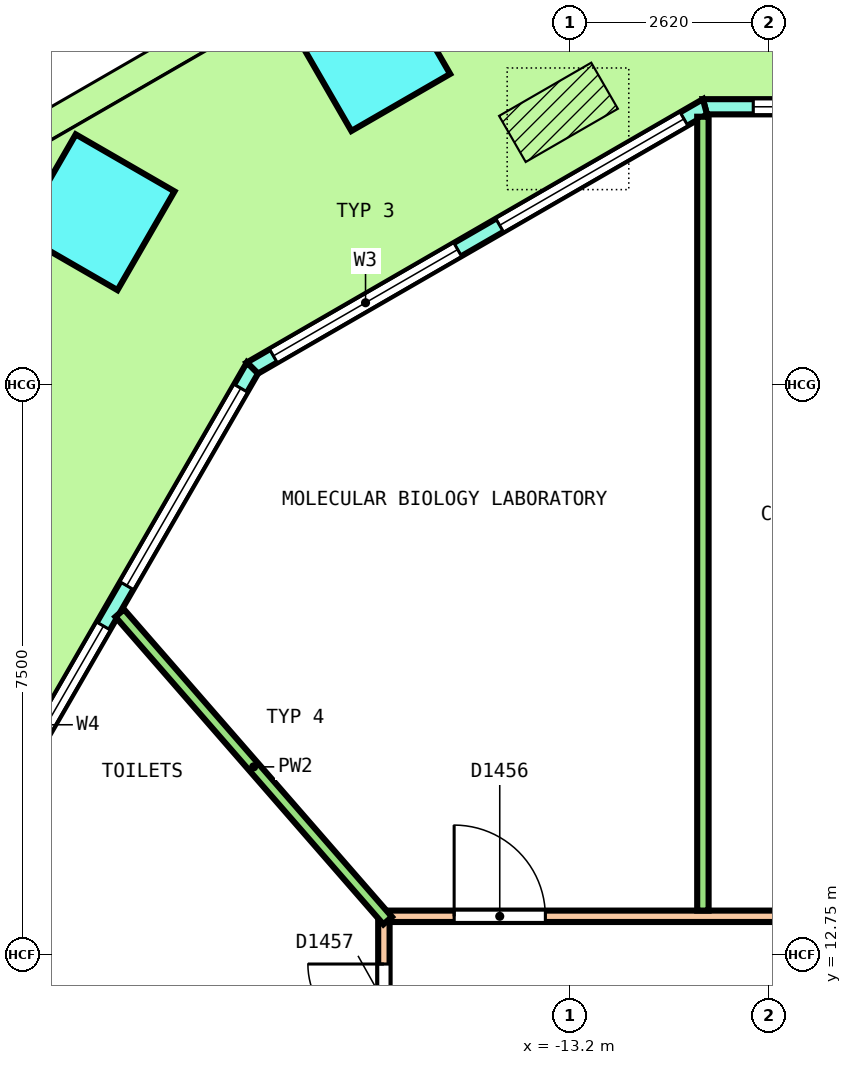
"""IFC4 building model, lengths in metres.
Left out: names, types, materials, properties, quantities, classifications, styles, units other than length and angle.
Written with IfcOpenShell. Run it as: python <this file> out.ifc"""

import sys

from ifc_helpers import new_model, si_unit, direction, frame, frame_2d, origin, origin_2d, place, context, subcontext, project, spatial, polyline, rectangle, outline, extrude, element, fill, save


model = new_model("IFC4")
c1 = context("Model", 3, precision=1e-05, world=origin(), true_north=direction((0.0, 1.0)))
c2 = subcontext(c1, "Body", "Model", "MODEL_VIEW")
j1 = project(units=[si_unit("LENGTHUNIT", "METRE"), si_unit("PLANEANGLEUNIT", "RADIAN")], contexts=[c1])
p1 = place(None, origin())
s1 = spatial("IfcSite", under=j1, at=p1, CompositionType="ELEMENT")
p2 = place(p1, origin())
s2 = spatial("IfcBuilding", under=s1, at=p2, CompositionType="ELEMENT")
p3 = place(p2, frame((0.0, 0.0, 63.0)))
s3 = spatial("IfcBuildingStorey", under=s2, at=p3, CompositionType="ELEMENT", Elevation=63.0)
for number, where, z_axis, x_axis in (
    (1, (-15.803, 24.606, 0.0), (0.0, 0.0, 1.0), (-0.866, -0.5, 0.0)),
    (2, (-19.43, 22.512, 0.0), (0.0, 0.0, 1.0), (-0.5, -0.866, 0.0)),
):
    element("IfcColumn", number, at=place(p3, frame(where, z_axis=z_axis, x_axis=x_axis)), inside=s3, PredefinedType="COLUMN", context=c2, shape_type="SweptSolid", body=[
        extrude(rectangle(XDim=1.5, YDim=1.5, at=origin_2d()), origin(), (0.0, 0.0, 1.0), 4.04),
    ])
p4 = place(p3, frame((11.426, 23.9, 0.0), z_axis=(0.0, 0.0, 1.0), x_axis=(-1.0, 0.0, 0.0)))
e3 = element("IfcWall", 3, at=p4, inside=s3, PredefinedType="SOLIDWALL", context=c2, shape_type="SweptSolid", body=[
    extrude(outline(polyline([(-0.027, -0.1), (1.014, -0.1), (2.055, -0.1), (3.097, -0.1), (4.138, -0.1), (5.179, -0.1), (6.22, -0.1), (7.261, -0.1), (8.303, -0.1), (9.344, -0.1), (10.385, -0.1), (11.426, -0.1), (12.468, -0.1), (13.509, -0.1), (14.55, -0.1), (15.591, -0.1), (16.632, -0.1), (17.673, -0.1), (18.715, -0.1), (19.756, -0.1), (20.797, -0.1), (21.838, -0.1), (22.879, -0.1), (22.826, 0.1), (21.789, 0.1), (20.753, 0.1), (19.717, 0.1), (18.68, 0.1), (17.644, 0.1), (16.608, 0.1), (15.572, 0.1), (14.535, 0.1), (13.499, 0.1), (12.463, 0.1), (11.426, 0.1), (10.39, 0.1), (9.354, 0.1), (8.317, 0.1), (7.281, 0.1), (6.245, 0.1), (5.208, 0.1), (4.172, 0.1), (3.136, 0.1), (2.099, 0.1), (1.063, 0.1), (0.027, 0.1), (-0.027, -0.1)])), origin(), (0.0, 0.0, 1.0), 4.1),
])
p5 = place(p4, frame((0.635, 0.0, 0.1)))
e4 = element("IfcOpeningElement", 4, at=p5, cuts=e3, PredefinedType="OPENING", context=c2, shape_type="SweptSolid", body=[
    extrude(rectangle(XDim=3.3, YDim=2.9, at=frame_2d((1.65, 1.45))), frame((0.0, 0.11, 0.0), z_axis=(0.0, -1.0, 0.0), x_axis=(1.0, 0.0, 0.0)), (0.0, 0.0, 1.0), 0.22),
])
p6 = place(p4, frame((5.206, 0.0, 0.1)))
e5 = element("IfcOpeningElement", 5, at=p6, cuts=e3, PredefinedType="OPENING", context=c2, shape_type="SweptSolid", body=[
    extrude(rectangle(XDim=3.3, YDim=2.9, at=frame_2d((1.65, 1.45))), frame((0.0, 0.11, 0.0), z_axis=(0.0, -1.0, 0.0), x_axis=(1.0, 0.0, 0.0)), (0.0, 0.0, 1.0), 0.22),
])
p7 = place(p4, frame((10.526, 0.0, 0.0)))
e6 = element("IfcOpeningElement", 6, at=p7, cuts=e3, PredefinedType="OPENING", context=c2, shape_type="SweptSolid", body=[
    extrude(rectangle(XDim=1.8, YDim=2.4, at=frame_2d((0.9, 1.2))), frame((0.0, 0.11, 0.0), z_axis=(0.0, -1.0, 0.0), x_axis=(1.0, 0.0, 0.0)), (0.0, 0.0, 1.0), 0.22),
])
p8 = place(p4, frame((10.526, 0.0, 2.55)))
e7 = element("IfcOpeningElement", 7, at=p8, cuts=e3, PredefinedType="OPENING", context=c2, shape_type="SweptSolid", body=[
    extrude(rectangle(XDim=1.8, YDim=0.45, at=frame_2d((0.9, 0.225))), frame((0.0, 0.11, 0.0), z_axis=(0.0, -1.0, 0.0), x_axis=(1.0, 0.0, 0.0)), (0.0, 0.0, 1.0), 0.22),
])
p9 = place(p4, frame((14.347, 0.0, 0.1)))
e8 = element("IfcOpeningElement", 8, at=p9, cuts=e3, PredefinedType="OPENING", context=c2, shape_type="SweptSolid", body=[
    extrude(rectangle(XDim=3.3, YDim=2.9, at=frame_2d((1.65, 1.45))), frame((0.0, 0.11, 0.0), z_axis=(0.0, -1.0, 0.0), x_axis=(1.0, 0.0, 0.0)), (0.0, 0.0, 1.0), 0.22),
])
p10 = place(p4, frame((18.917, 0.0, 0.1)))
e9 = element("IfcOpeningElement", 9, at=p10, cuts=e3, PredefinedType="OPENING", context=c2, shape_type="SweptSolid", body=[
    extrude(rectangle(XDim=3.3, YDim=2.9, at=frame_2d((1.65, 1.45))), frame((0.0, 0.11, 0.0), z_axis=(0.0, -1.0, 0.0), x_axis=(1.0, 0.0, 0.0)), (0.0, 0.0, 1.0), 0.22),
])
p11 = place(p3, frame((-11.426, 23.9, 0.0), z_axis=(0.0, 0.0, 1.0), x_axis=(-0.866029458321, -0.49999297727, 0.0)))
e10 = element("IfcWall", 10, at=p11, inside=s3, PredefinedType="SOLIDWALL", context=c2, shape_type="SweptSolid", body=[
    extrude(outline(polyline([(-0.027, -0.1), (1.128, -0.1), (2.282, -0.1), (3.437, -0.1), (4.592, -0.1), (5.747, -0.1), (6.901, -0.1), (6.848, 0.1), (5.711, 0.1), (4.574, 0.1), (3.437, 0.1), (2.301, 0.1), (1.164, 0.1), (0.027, 0.1), (-0.027, -0.1)])), origin(), (0.0, 0.0, 1.0), 4.1),
])
p12 = place(p11, frame((0.319, 0.0, 0.1)))
e11 = element("IfcOpeningElement", 11, at=p12, cuts=e10, PredefinedType="OPENING", context=c2, shape_type="SweptSolid", body=[
    extrude(rectangle(XDim=2.8, YDim=2.9, at=frame_2d((1.4, 1.45))), frame((0.0, 0.11, 0.0), z_axis=(0.0, -1.0, 0.0), x_axis=(1.0, 0.0, 0.0)), (0.0, 0.0, 1.0), 0.22),
])
p13 = place(p11, frame((3.756, 0.0, 0.1)))
e12 = element("IfcOpeningElement", 12, at=p13, cuts=e10, PredefinedType="OPENING", context=c2, shape_type="SweptSolid", body=[
    extrude(rectangle(XDim=2.8, YDim=2.9, at=frame_2d((1.4, 1.45))), frame((0.0, 0.11, 0.0), z_axis=(0.0, -1.0, 0.0), x_axis=(1.0, 0.0, 0.0)), (0.0, 0.0, 1.0), 0.22),
])
p14 = place(p3, frame((-17.38, 20.463, 0.0), z_axis=(0.0, 0.0, 1.0), x_axis=(-0.500000137386, -0.866025324465, 0.0)))
e13 = element("IfcWall", 13, at=p14, inside=s3, PredefinedType="SOLIDWALL", context=c2, shape_type="SweptSolid", body=[
    extrude(outline(polyline([(-0.027, -0.1), (0.979, -0.1), (1.986, -0.1), (2.992, -0.1), (3.999, -0.1), (5.005, -0.1), (6.012, -0.1), (7.018, -0.1), (8.025, -0.1), (9.031, -0.1), (10.038, -0.1), (11.044, -0.1), (12.051, -0.1), (13.057, -0.1), (14.063, -0.1), (15.07, -0.1), (16.076, -0.1), (17.083, -0.1), (18.089, -0.1), (18.036, 0.1), (17.035, 0.1), (16.035, 0.1), (15.034, 0.1), (14.034, 0.1), (13.033, 0.1), (12.033, 0.1), (11.032, 0.1), (10.032, 0.1), (9.031, 0.1), (8.031, 0.1), (7.03, 0.1), (6.03, 0.1), (5.029, 0.1), (4.029, 0.1), (3.028, 0.1), (2.028, 0.1), (1.027, 0.1), (0.027, 0.1), (-0.027, -0.1)])), origin(), (0.0, 0.0, 1.0), 4.1),
])
p15 = place(p14, frame((0.306, 0.0, 0.1)))
e14 = element("IfcOpeningElement", 14, at=p15, cuts=e13, PredefinedType="OPENING", context=c2, shape_type="SweptSolid", body=[
    extrude(rectangle(XDim=3.0, YDim=2.9, at=frame_2d((1.5, 1.45))), frame((0.0, 0.11, 0.0), z_axis=(0.0, -1.0, 0.0), x_axis=(1.0, 0.0, 0.0)), (0.0, 0.0, 1.0), 0.22),
])
p16 = place(p14, frame((3.919, 0.0, 0.1)))
e15 = element("IfcOpeningElement", 15, at=p16, cuts=e13, PredefinedType="OPENING", context=c2, shape_type="SweptSolid", body=[
    extrude(rectangle(XDim=3.0, YDim=2.9, at=frame_2d((1.5, 1.45))), frame((0.0, 0.11, 0.0), z_axis=(0.0, -1.0, 0.0), x_axis=(1.0, 0.0, 0.0)), (0.0, 0.0, 1.0), 0.22),
])
p17 = place(p14, frame((8.131, 0.0, 0.0)))
e16 = element("IfcOpeningElement", 16, at=p17, cuts=e13, PredefinedType="OPENING", context=c2, shape_type="SweptSolid", body=[
    extrude(rectangle(XDim=1.8, YDim=2.4, at=frame_2d((0.9, 1.2))), frame((0.0, 0.11, 0.0), z_axis=(0.0, -1.0, 0.0), x_axis=(1.0, 0.0, 0.0)), (0.0, 0.0, 1.0), 0.22),
])
p18 = place(p14, frame((8.131, 0.0, 2.55)))
e17 = element("IfcOpeningElement", 17, at=p18, cuts=e13, PredefinedType="OPENING", context=c2, shape_type="SweptSolid", body=[
    extrude(rectangle(XDim=1.8, YDim=0.45, at=frame_2d((0.9, 0.225))), frame((0.0, 0.11, 0.0), z_axis=(0.0, -1.0, 0.0), x_axis=(1.0, 0.0, 0.0)), (0.0, 0.0, 1.0), 0.22),
])
p19 = place(p14, frame((11.144, 0.0, 0.1)))
e18 = element("IfcOpeningElement", 18, at=p19, cuts=e13, PredefinedType="OPENING", context=c2, shape_type="SweptSolid", body=[
    extrude(rectangle(XDim=3.0, YDim=2.9, at=frame_2d((1.5, 1.45))), frame((0.0, 0.11, 0.0), z_axis=(0.0, -1.0, 0.0), x_axis=(1.0, 0.0, 0.0)), (0.0, 0.0, 1.0), 0.22),
])
p20 = place(p14, frame((14.756, 0.0, 0.1)))
e19 = element("IfcOpeningElement", 19, at=p20, cuts=e13, PredefinedType="OPENING", context=c2, shape_type="SweptSolid", body=[
    extrude(rectangle(XDim=3.0, YDim=2.9, at=frame_2d((1.5, 1.45))), frame((0.0, 0.11, 0.0), z_axis=(0.0, -1.0, 0.0), x_axis=(1.0, 0.0, 0.0)), (0.0, 0.0, 1.0), 0.22),
])
p21 = place(p3, frame((-15.575, 13.25, 0.0), z_axis=(0.0, 0.0, 1.0), x_axis=(1.0, 0.0, 0.0)))
e20 = element("IfcWall", 20, at=p21, inside=s3, PredefinedType="PARTITIONING", context=c2, shape_type="SweptSolid", body=[
    extrude(rectangle(XDim=31.175, YDim=0.15, at=frame_2d((15.587, 0.0))), origin(), (0.0, 0.0, 1.0), 3.05),
])
p22 = place(p21, frame((28.252, 0.0, 0.0)))
e21 = element("IfcOpeningElement", 21, at=p22, cuts=e20, PredefinedType="OPENING", context=c2, shape_type="SweptSolid", body=[
    extrude(rectangle(XDim=1.0, YDim=2.1, at=frame_2d((0.5, 1.05))), frame((0.0, 0.085, 0.0), z_axis=(0.0, -1.0, 0.0), x_axis=(1.0, 0.0, 0.0)), (0.0, 0.0, 1.0), 0.17),
])
p23 = place(p21, frame((14.802, 0.0, 0.0)))
e22 = element("IfcOpeningElement", 22, at=p23, cuts=e20, PredefinedType="OPENING", context=c2, shape_type="SweptSolid", body=[
    extrude(rectangle(XDim=1.2, YDim=2.1, at=frame_2d((0.6, 1.05))), frame((0.0, 0.085, 0.0), z_axis=(0.0, -1.0, 0.0), x_axis=(1.0, 0.0, 0.0)), (0.0, 0.0, 1.0), 0.17),
])
p24 = place(p21, frame((5.812, 0.0, 0.0)))
e23 = element("IfcOpeningElement", 23, at=p24, cuts=e20, PredefinedType="OPENING", context=c2, shape_type="SweptSolid", body=[
    extrude(rectangle(XDim=1.2, YDim=2.1, at=frame_2d((0.6, 1.05))), frame((0.0, 0.085, 0.0), z_axis=(0.0, -1.0, 0.0), x_axis=(1.0, 0.0, 0.0)), (0.0, 0.0, 1.0), 0.17),
])
p25 = place(p21, frame((0.849, 0.0, 0.0)))
e24 = element("IfcOpeningElement", 24, at=p25, cuts=e20, PredefinedType="OPENING", context=c2, shape_type="SweptSolid", body=[
    extrude(rectangle(XDim=1.2, YDim=2.1, at=frame_2d((0.6, 1.05))), frame((0.0, 0.085, 0.0), z_axis=(0.0, -1.0, 0.0), x_axis=(1.0, 0.0, 0.0)), (0.0, 0.0, 1.0), 0.17),
])
p26 = place(p3, frame((-15.65, -13.175, 0.0), z_axis=(0.0, 0.0, 1.0), x_axis=(0.0, 1.0, 0.0)))
e25 = element("IfcWall", 25, at=p26, inside=s3, PredefinedType="PARTITIONING", context=c2, shape_type="SweptSolid", body=[
    extrude(rectangle(XDim=26.35, YDim=0.15, at=frame_2d((13.175, 0.0))), origin(), (0.0, 0.0, 1.0), 3.05),
])
p27 = place(p26, frame((24.797, 0.0, 0.0)))
e26 = element("IfcOpeningElement", 26, at=p27, cuts=e25, PredefinedType="OPENING", context=c2, shape_type="SweptSolid", body=[
    extrude(rectangle(XDim=1.0, YDim=2.1, at=frame_2d((0.5, 1.05))), frame((0.0, 0.085, 0.0), z_axis=(0.0, -1.0, 0.0), x_axis=(1.0, 0.0, 0.0)), (0.0, 0.0, 1.0), 0.17),
])
p28 = place(p26, frame((21.346, 0.0, 0.0)))
e27 = element("IfcOpeningElement", 27, at=p28, cuts=e25, PredefinedType="OPENING", context=c2, shape_type="SweptSolid", body=[
    extrude(rectangle(XDim=1.0, YDim=2.1, at=frame_2d((0.5, 1.05))), frame((0.0, 0.085, 0.0), z_axis=(0.0, -1.0, 0.0), x_axis=(1.0, 0.0, 0.0)), (0.0, 0.0, 1.0), 0.17),
])
p29 = place(p26, frame((8.046, 0.0, 0.0)))
e28 = element("IfcOpeningElement", 28, at=p29, cuts=e25, PredefinedType="OPENING", context=c2, shape_type="SweptSolid", body=[
    extrude(rectangle(XDim=1.2, YDim=2.1, at=frame_2d((0.6, 1.05))), frame((0.0, 0.085, 0.0), z_axis=(0.0, -1.0, 0.0), x_axis=(1.0, 0.0, 0.0)), (0.0, 0.0, 1.0), 0.17),
])
p30 = place(p3, frame((-11.453, 13.325, 0.0), z_axis=(0.0, 0.0, 1.0), x_axis=(0.0, 1.0, 0.0)))
e29 = element("IfcWall", 29, at=p30, inside=s3, PredefinedType="PARTITIONING", context=c2, shape_type="SweptSolid", body=[
    extrude(rectangle(XDim=10.444, YDim=0.15, at=frame_2d((5.222, 0.0))), origin(), (0.0, 0.0, 1.0), 3.05),
])
p31 = place(p3, frame((-19.126, 17.239, 0.0), z_axis=(0.0, 0.0, 1.0), x_axis=(0.65698603945, -0.753902741717, 0.0)))
e30 = element("IfcWall", 30, at=p31, inside=s3, PredefinedType="PARTITIONING", context=c2, shape_type="SweptSolid", body=[
    extrude(rectangle(XDim=5.366, YDim=0.15, at=frame_2d((2.683, 0.0))), origin(), (0.0, 0.0, 1.0), 3.05),
])
p32 = place(p10, origin())
e31 = element("IfcWindow", 31, at=p32, inside=s3, PartitioningType="SINGLE_PANEL", PredefinedType="WINDOW", context=c2, shape_type="SweptSolid", body=[
    extrude(rectangle(XDim=3.3, YDim=2.9, at=frame_2d((1.65, 1.45))), frame((0.0, 0.03, 0.0), z_axis=(0.0, -1.0, 0.0), x_axis=(1.0, 0.0, 0.0)), (0.0, 0.0, 1.0), 0.06),
])
fill(e9, e31)
p33 = place(p12, origin())
e32 = element("IfcWindow", 32, at=p33, inside=s3, PartitioningType="SINGLE_PANEL", PredefinedType="WINDOW", context=c2, shape_type="SweptSolid", body=[
    extrude(rectangle(XDim=2.8, YDim=2.9, at=frame_2d((1.4, 1.45))), frame((0.0, 0.03, 0.0), z_axis=(0.0, -1.0, 0.0), x_axis=(1.0, 0.0, 0.0)), (0.0, 0.0, 1.0), 0.06),
])
fill(e11, e32)
p34 = place(p13, origin())
e33 = element("IfcWindow", 33, at=p34, inside=s3, PartitioningType="SINGLE_PANEL", PredefinedType="WINDOW", context=c2, shape_type="SweptSolid", body=[
    extrude(rectangle(XDim=2.8, YDim=2.9, at=frame_2d((1.4, 1.45))), frame((0.0, 0.03, 0.0), z_axis=(0.0, -1.0, 0.0), x_axis=(1.0, 0.0, 0.0)), (0.0, 0.0, 1.0), 0.06),
])
fill(e12, e33)
p35 = place(p15, origin())
e34 = element("IfcWindow", 34, at=p35, inside=s3, PartitioningType="SINGLE_PANEL", PredefinedType="WINDOW", context=c2, shape_type="SweptSolid", body=[
    extrude(rectangle(XDim=3.0, YDim=2.9, at=frame_2d((1.5, 1.45))), frame((0.0, 0.03, 0.0), z_axis=(0.0, -1.0, 0.0), x_axis=(1.0, 0.0, 0.0)), (0.0, 0.0, 1.0), 0.06),
])
fill(e14, e34)
p36 = place(p16, origin())
e35 = element("IfcWindow", 35, at=p36, inside=s3, PartitioningType="SINGLE_PANEL", PredefinedType="WINDOW", context=c2, shape_type="SweptSolid", body=[
    extrude(rectangle(XDim=3.0, YDim=2.9, at=frame_2d((1.5, 1.45))), frame((0.0, 0.03, 0.0), z_axis=(0.0, -1.0, 0.0), x_axis=(1.0, 0.0, 0.0)), (0.0, 0.0, 1.0), 0.06),
])
fill(e15, e35)
p37 = place(p25, origin())
e36 = element("IfcDoor", 36, at=p37, inside=s3, OperationType="DOUBLE_DOOR_SINGLE_SWING", PredefinedType="DOOR", context=c2, shape_type="SweptSolid", body=[
    extrude(rectangle(XDim=1.2, YDim=2.1, at=frame_2d((0.6, 1.05))), frame((0.0, 0.025, 0.0), z_axis=(0.0, -1.0, 0.0), x_axis=(1.0, 0.0, 0.0)), (0.0, 0.0, 1.0), 0.05),
])
fill(e24, e36)
p38 = place(p27, origin())
e37 = element("IfcDoor", 37, at=p38, inside=s3, OperationType="SINGLE_SWING_RIGHT", PredefinedType="DOOR", context=c2, shape_type="SweptSolid", body=[
    extrude(rectangle(XDim=1.0, YDim=2.1, at=frame_2d((0.5, 1.05))), frame((0.0, 0.025, 0.0), z_axis=(0.0, -1.0, 0.0), x_axis=(1.0, 0.0, 0.0)), (0.0, 0.0, 1.0), 0.05),
])
fill(e26, e37)
save(model, sys.argv[1])
